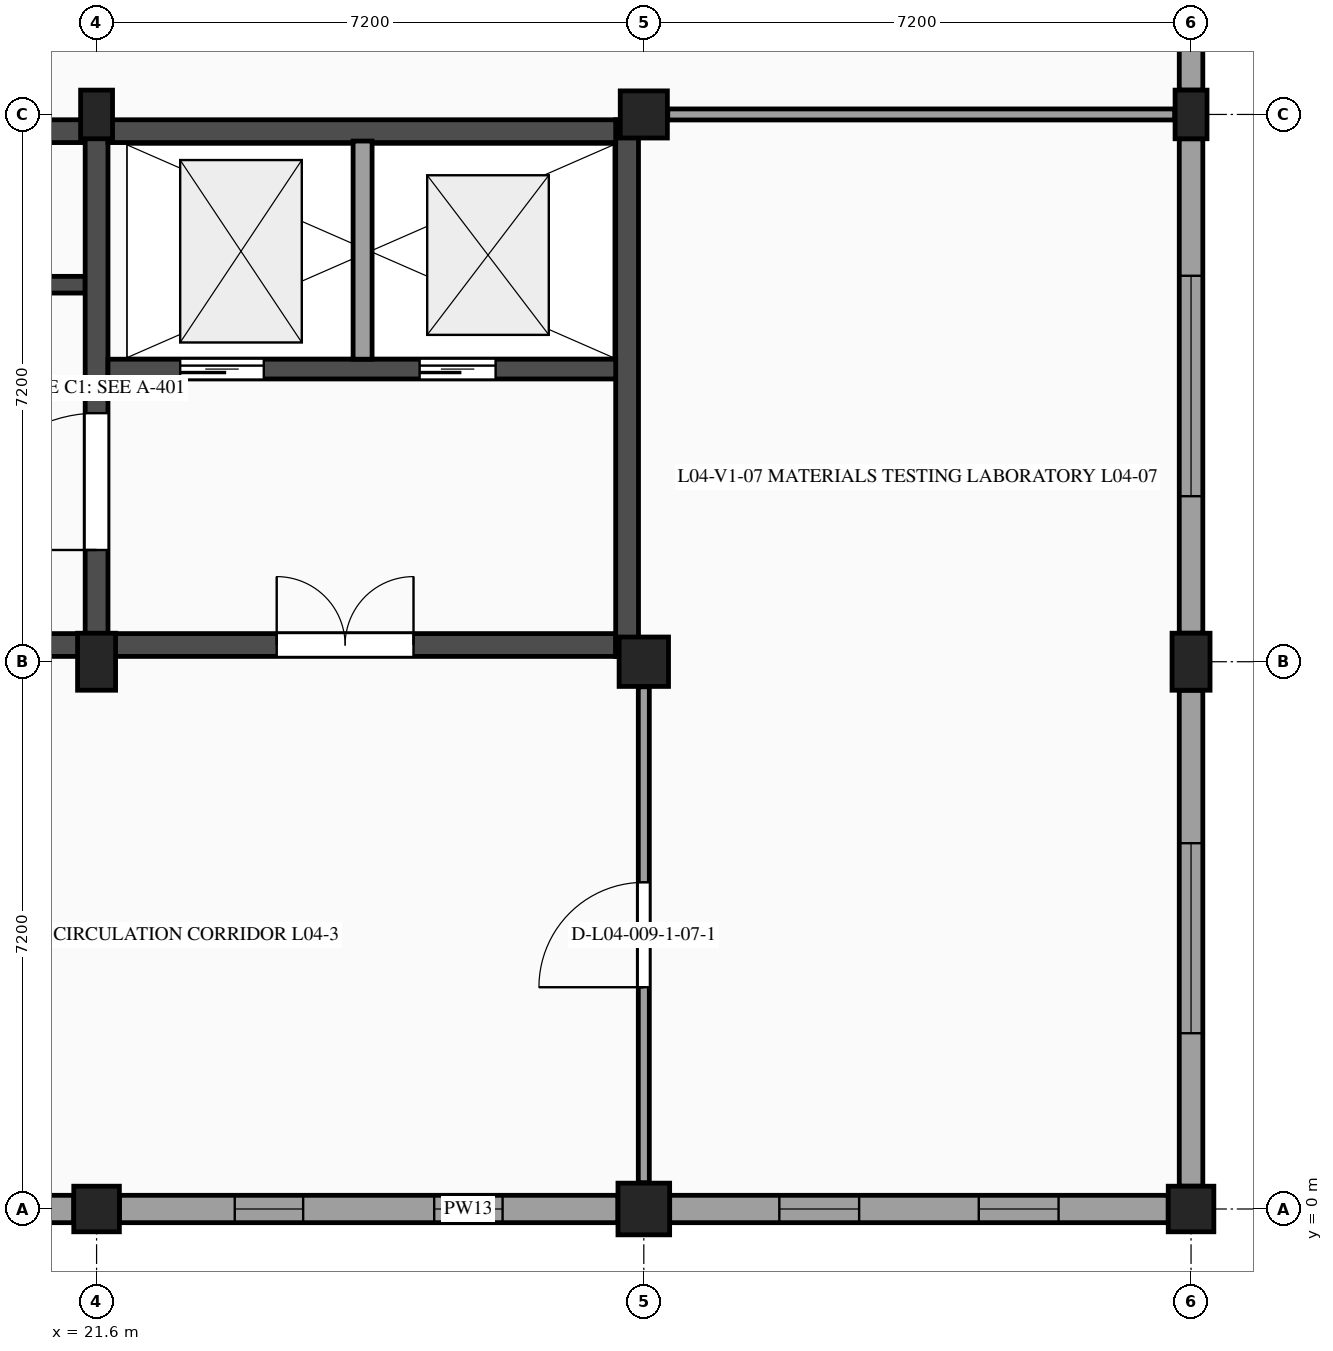
"""IFC4 building model, lengths in metres.
Left out: names, types, materials, properties, quantities, classifications, styles, units other than length and angle.
Written with IfcOpenShell. Run it as: python <this file> out.ifc"""

import sys

from ifc_helpers import new_model, si_unit, direction, frame, frame_2d, origin, origin_2d, place, context, subcontext, project, spatial, rectangle, extrude, element, fill, save


model = new_model("IFC4")
c1 = context("Model", 3, precision=1e-05, world=origin(), true_north=direction((0.0, 1.0)))
c2 = subcontext(c1, "Body", "Model", "MODEL_VIEW")
j1 = project(units=[si_unit("LENGTHUNIT", "METRE"), si_unit("PLANEANGLEUNIT", "RADIAN")], contexts=[c1])
p1 = place(None, origin())
s1 = spatial("IfcSite", under=j1, at=p1, CompositionType="ELEMENT")
p2 = place(p1, origin())
s2 = spatial("IfcBuilding", under=s1, at=p2, CompositionType="ELEMENT")
p3 = place(p2, frame((0.0, 0.0, 18.6)))
s3 = spatial("IfcBuildingStorey", under=s2, at=p3, CompositionType="ELEMENT", Elevation=18.6)
p4 = place(p3, frame((21.6, 0.0, 0.0), z_axis=(0.0, 0.0, 1.0), x_axis=(1.0, 0.0, 0.0)))
e1 = element("IfcColumn", 1, at=p4, inside=s3, PredefinedType="COLUMN", context=c2, shape_type="SweptSolid", body=[
    extrude(rectangle(XDim=0.6, YDim=0.6, at=origin_2d()), origin(), (0.0, 0.0, 1.0), 4.2),
])
p5 = place(p3, frame((21.6, 7.2, 0.0), z_axis=(0.0, 0.0, 1.0), x_axis=(1.0, 0.0, 0.0)))
e2 = element("IfcColumn", 2, at=p5, inside=s3, PredefinedType="COLUMN", context=c2, shape_type="SweptSolid", body=[
    extrude(rectangle(XDim=0.5, YDim=0.75, at=origin_2d()), origin(), (0.0, 0.0, 1.0), 4.2),
])
p6 = place(p3, frame((21.6, 14.4, 0.0), z_axis=(0.0, 0.0, 1.0), x_axis=(1.0, 0.0, 0.0)))
e3 = element("IfcColumn", 3, at=p6, inside=s3, PredefinedType="PILASTER", context=c2, shape_type="SweptSolid", body=[
    extrude(rectangle(XDim=0.42, YDim=0.64, at=origin_2d()), origin(), (0.0, 0.0, 1.0), 4.2),
])
p7 = place(p3, frame((28.8, 0.0, 0.0), z_axis=(0.0, 0.0, 1.0), x_axis=(1.0, 0.0, 0.0)))
e4 = element("IfcColumn", 4, at=p7, inside=s3, PredefinedType="COLUMN", context=c2, shape_type="SweptSolid", body=[
    extrude(rectangle(XDim=0.68, YDim=0.68, at=origin_2d()), origin(), (0.0, 0.0, 1.0), 4.2),
])
p8 = place(p3, frame((28.8, 7.2, 0.0), z_axis=(0.0, 0.0, 1.0), x_axis=(1.0, 0.0, 0.0)))
e5 = element("IfcColumn", 5, at=p8, inside=s3, PredefinedType="COLUMN", context=c2, shape_type="SweptSolid", body=[
    extrude(rectangle(XDim=0.65, YDim=0.65, at=origin_2d()), origin(), (0.0, 0.0, 1.0), 4.2),
])
p9 = place(p3, frame((28.8, 14.4, 0.0), z_axis=(0.0, 0.0, 1.0), x_axis=(1.0, 0.0, 0.0)))
e6 = element("IfcColumn", 6, at=p9, inside=s3, PredefinedType="COLUMN", context=c2, shape_type="SweptSolid", body=[
    extrude(rectangle(XDim=0.62, YDim=0.62, at=origin_2d()), origin(), (0.0, 0.0, 1.0), 4.2),
])
p10 = place(p3, frame((36.0, 0.0, 0.0), z_axis=(0.0, 0.0, 1.0), x_axis=(1.0, 0.0, 0.0)))
e7 = element("IfcColumn", 7, at=p10, inside=s3, PredefinedType="COLUMN", context=c2, shape_type="SweptSolid", body=[
    extrude(rectangle(XDim=0.6, YDim=0.6, at=origin_2d()), origin(), (0.0, 0.0, 1.0), 4.2),
])
p11 = place(p3, frame((36.0, 7.2, 0.0), z_axis=(0.0, 0.0, 1.0), x_axis=(1.0, 0.0, 0.0)))
e8 = element("IfcColumn", 8, at=p11, inside=s3, PredefinedType="COLUMN", context=c2, shape_type="SweptSolid", body=[
    extrude(rectangle(XDim=0.5, YDim=0.75, at=origin_2d()), origin(), (0.0, 0.0, 1.0), 4.2),
])
p12 = place(p3, frame((36.0, 14.4, 0.0), z_axis=(0.0, 0.0, 1.0), x_axis=(1.0, 0.0, 0.0)))
e9 = element("IfcColumn", 9, at=p12, inside=s3, PredefinedType="PILASTER", context=c2, shape_type="SweptSolid", body=[
    extrude(rectangle(XDim=0.42, YDim=0.64, at=origin_2d()), origin(), (0.0, 0.0, 1.0), 4.2),
])
p13 = place(p3, frame((36.0, 21.26, 0.0), z_axis=(0.0, 0.0, 1.0), x_axis=(0.0, -1.0, 0.0)))
e10 = element("IfcWall", 10, at=p13, inside=s3, PredefinedType="STANDARD", context=c2, shape_type="SweptSolid", body=[
    extrude(rectangle(XDim=6.54, YDim=0.31, at=frame_2d((3.27, 0.0))), origin(), (0.0, 0.0, 1.0), 3.15),
])
p14 = place(p13, frame((1.37, 0.0, 0.98)))
e11 = element("IfcOpeningElement", 11, at=p14, cuts=e10, PredefinedType="OPENING", context=c2, shape_type="SweptSolid", body=[
    extrude(rectangle(XDim=3.8, YDim=1.6, at=frame_2d((1.9, 0.8))), frame((0.0, 0.165, 0.0), z_axis=(0.0, -1.0, 0.0), x_axis=(1.0, 0.0, 0.0)), (0.0, 0.0, 1.0), 0.33),
])
p15 = place(p3, frame((36.0, 14.08, 0.0), z_axis=(0.0, 0.0, 1.0), x_axis=(0.0, -1.0, 0.0)))
e12 = element("IfcWall", 12, at=p15, inside=s3, PredefinedType="STANDARD", context=c2, shape_type="SweptSolid", body=[
    extrude(rectangle(XDim=6.505, YDim=0.31, at=frame_2d((3.252, 0.0))), origin(), (0.0, 0.0, 1.0), 3.15),
])
p16 = place(p15, frame((1.802, 0.0, 0.98)))
e13 = element("IfcOpeningElement", 13, at=p16, cuts=e12, PredefinedType="OPENING", context=c2, shape_type="SweptSolid", body=[
    extrude(rectangle(XDim=2.9, YDim=1.6, at=frame_2d((1.45, 0.8))), frame((0.0, 0.165, 0.0), z_axis=(0.0, -1.0, 0.0), x_axis=(1.0, 0.0, 0.0)), (0.0, 0.0, 1.0), 0.33),
])
p17 = place(p3, frame((36.0, 6.825, 0.0), z_axis=(0.0, 0.0, 1.0), x_axis=(0.0, -1.0, 0.0)))
e14 = element("IfcWall", 14, at=p17, inside=s3, PredefinedType="STANDARD", context=c2, shape_type="SweptSolid", body=[
    extrude(rectangle(XDim=6.525, YDim=0.31, at=frame_2d((3.262, 0.0))), origin(), (0.0, 0.0, 1.0), 3.15),
])
p18 = place(p17, frame((2.012, 0.0, 0.98)))
e15 = element("IfcOpeningElement", 15, at=p18, cuts=e14, PredefinedType="OPENING", context=c2, shape_type="SweptSolid", body=[
    extrude(rectangle(XDim=2.5, YDim=1.35, at=frame_2d((1.25, 0.675))), frame((0.0, 0.165, 0.0), z_axis=(0.0, -1.0, 0.0), x_axis=(1.0, 0.0, 0.0)), (0.0, 0.0, 1.0), 0.33),
])
p19 = place(p3, frame((35.7, 0.0, 0.0), z_axis=(0.0, 0.0, 1.0), x_axis=(-1.0, 0.0, 0.0)))
e16 = element("IfcWall", 16, at=p19, inside=s3, PredefinedType="STANDARD", context=c2, shape_type="SweptSolid", body=[
    extrude(rectangle(XDim=6.56, YDim=0.36, at=frame_2d((3.28, 0.0))), origin(), (0.0, 0.0, 1.0), 3.2),
])
p20 = place(p19, frame((1.443, 0.0, 1.15)))
e17 = element("IfcOpeningElement", 17, at=p20, cuts=e16, PredefinedType="OPENING", context=c2, shape_type="SweptSolid", body=[
    extrude(rectangle(XDim=1.05, YDim=1.35, at=frame_2d((0.525, 0.675))), frame((0.0, 0.19, 0.0), z_axis=(0.0, -1.0, 0.0), x_axis=(1.0, 0.0, 0.0)), (0.0, 0.0, 1.0), 0.38),
])
p21 = place(p19, frame((4.067, 0.0, 1.15)))
e18 = element("IfcOpeningElement", 18, at=p21, cuts=e16, PredefinedType="OPENING", context=c2, shape_type="SweptSolid", body=[
    extrude(rectangle(XDim=1.05, YDim=1.35, at=frame_2d((0.525, 0.675))), frame((0.0, 0.19, 0.0), z_axis=(0.0, -1.0, 0.0), x_axis=(1.0, 0.0, 0.0)), (0.0, 0.0, 1.0), 0.38),
])
p22 = place(p3, frame((28.46, 0.0, 0.0), z_axis=(0.0, 0.0, 1.0), x_axis=(-1.0, 0.0, 0.0)))
e19 = element("IfcWall", 19, at=p22, inside=s3, PredefinedType="STANDARD", context=c2, shape_type="SweptSolid", body=[
    extrude(rectangle(XDim=6.56, YDim=0.36, at=frame_2d((3.28, 0.0))), origin(), (0.0, 0.0, 1.0), 3.2),
])
p23 = place(p22, frame((1.518, 0.0, 1.15)))
e20 = element("IfcOpeningElement", 20, at=p23, cuts=e19, PredefinedType="OPENING", context=c2, shape_type="SweptSolid", body=[
    extrude(rectangle(XDim=0.9, YDim=1.3, at=frame_2d((0.45, 0.65))), frame((0.0, 0.19, 0.0), z_axis=(0.0, -1.0, 0.0), x_axis=(1.0, 0.0, 0.0)), (0.0, 0.0, 1.0), 0.38),
])
p24 = place(p22, frame((4.142, 0.0, 1.15)))
e21 = element("IfcOpeningElement", 21, at=p24, cuts=e19, PredefinedType="OPENING", context=c2, shape_type="SweptSolid", body=[
    extrude(rectangle(XDim=0.9, YDim=1.3, at=frame_2d((0.45, 0.65))), frame((0.0, 0.19, 0.0), z_axis=(0.0, -1.0, 0.0), x_axis=(1.0, 0.0, 0.0)), (0.0, 0.0, 1.0), 0.38),
])
p25 = place(p3, frame((21.3, 0.0, 0.0), z_axis=(0.0, 0.0, 1.0), x_axis=(-1.0, 0.0, 0.0)))
e22 = element("IfcWall", 22, at=p25, inside=s3, PredefinedType="STANDARD", context=c2, shape_type="SweptSolid", body=[
    extrude(rectangle(XDim=6.56, YDim=0.36, at=frame_2d((3.28, 0.0))), origin(), (0.0, 0.0, 1.0), 3.2),
])
p26 = place(p25, frame((1.218, 0.0, 1.15)))
e23 = element("IfcOpeningElement", 23, at=p26, cuts=e22, PredefinedType="OPENING", context=c2, shape_type="SweptSolid", body=[
    extrude(rectangle(XDim=1.5, YDim=1.2, at=frame_2d((0.75, 0.6))), frame((0.0, 0.19, 0.0), z_axis=(0.0, -1.0, 0.0), x_axis=(1.0, 0.0, 0.0)), (0.0, 0.0, 1.0), 0.38),
])
p27 = place(p25, frame((3.842, 0.0, 1.15)))
e24 = element("IfcOpeningElement", 24, at=p27, cuts=e22, PredefinedType="OPENING", context=c2, shape_type="SweptSolid", body=[
    extrude(rectangle(XDim=1.5, YDim=1.2, at=frame_2d((0.75, 0.6))), frame((0.0, 0.19, 0.0), z_axis=(0.0, -1.0, 0.0), x_axis=(1.0, 0.0, 0.0)), (0.0, 0.0, 1.0), 0.38),
])
p28 = place(p3, frame((14.77, 7.42, 0.0), z_axis=(0.0, 0.0, 1.0), x_axis=(1.0, 0.0, 0.0)))
e25 = element("IfcWall", 25, at=p28, inside=s3, PredefinedType="SHEAR", context=c2, shape_type="SweptSolid", body=[
    extrude(rectangle(XDim=6.68, YDim=0.3, at=frame_2d((3.34, 0.0))), origin(), (0.0, 0.0, 1.0), 3.955),
])
p29 = place(p3, frame((14.77, 14.18, 0.0), z_axis=(0.0, 0.0, 1.0), x_axis=(1.0, 0.0, 0.0)))
e26 = element("IfcWall", 26, at=p29, inside=s3, PredefinedType="SHEAR", context=c2, shape_type="SweptSolid", body=[
    extrude(rectangle(XDim=6.68, YDim=0.3, at=frame_2d((3.34, 0.0))), origin(), (0.0, 0.0, 1.0), 3.955),
])
p30 = place(p29, frame((1.42, 0.0, 0.0)))
e27 = element("IfcOpeningElement", 27, at=p30, cuts=e26, PredefinedType="OPENING", context=c2, shape_type="SweptSolid", body=[
    extrude(rectangle(XDim=0.85, YDim=2.1, at=frame_2d((0.425, 1.05))), frame((0.0, 0.16, 0.0), z_axis=(0.0, -1.0, 0.0), x_axis=(1.0, 0.0, 0.0)), (0.0, 0.0, 1.0), 0.32),
])
p31 = place(p29, frame((3.4, 0.0, 0.0)))
e28 = element("IfcOpeningElement", 28, at=p31, cuts=e26, PredefinedType="OPENING", context=c2, shape_type="SweptSolid", body=[
    extrude(rectangle(XDim=0.95, YDim=2.15, at=frame_2d((0.475, 1.075))), frame((0.0, 0.16, 0.0), z_axis=(0.0, -1.0, 0.0), x_axis=(1.0, 0.0, 0.0)), (0.0, 0.0, 1.0), 0.32),
])
p32 = place(p3, frame((14.77, 12.16, 0.0), z_axis=(0.0, 0.0, 1.0), x_axis=(1.0, 0.0, 0.0)))
e29 = element("IfcWall", 29, at=p32, inside=s3, PredefinedType="SHEAR", context=c2, shape_type="SweptSolid", body=[
    extrude(rectangle(XDim=6.68, YDim=0.22, at=frame_2d((3.34, 0.0))), origin(), (0.0, 0.0, 1.0), 3.955),
])
p33 = place(p3, frame((21.6, 7.27, 0.0), z_axis=(0.0, 0.0, 1.0), x_axis=(0.0, 1.0, 0.0)))
e30 = element("IfcWall", 30, at=p33, inside=s3, PredefinedType="SHEAR", context=c2, shape_type="SweptSolid", body=[
    extrude(rectangle(XDim=7.06, YDim=0.3, at=frame_2d((3.53, 0.0))), origin(), (0.0, 0.0, 1.0), 3.955),
])
p34 = place(p33, frame((1.4, 0.0, 0.0)))
e31 = element("IfcOpeningElement", 31, at=p34, cuts=e30, PredefinedType="OPENING", context=c2, shape_type="SweptSolid", body=[
    extrude(rectangle(XDim=1.8, YDim=2.2, at=frame_2d((0.9, 1.1))), frame((0.0, 0.16, 0.0), z_axis=(0.0, -1.0, 0.0), x_axis=(1.0, 0.0, 0.0)), (0.0, 0.0, 1.0), 0.32),
])
p35 = place(p3, frame((21.75, 7.42, 0.0), z_axis=(0.0, 0.0, 1.0), x_axis=(1.0, 0.0, 0.0)))
e32 = element("IfcWall", 32, at=p35, inside=s3, PredefinedType="SHEAR", context=c2, shape_type="SweptSolid", body=[
    extrude(rectangle(XDim=6.68, YDim=0.3, at=frame_2d((3.34, 0.0))), origin(), (0.0, 0.0, 1.0), 3.955),
])
p36 = place(p35, frame((2.22, 0.0, 0.0)))
e33 = element("IfcOpeningElement", 33, at=p36, cuts=e32, PredefinedType="OPENING", context=c2, shape_type="SweptSolid", body=[
    extrude(rectangle(XDim=1.8, YDim=2.2, at=frame_2d((0.9, 1.1))), frame((0.0, 0.16, 0.0), z_axis=(0.0, -1.0, 0.0), x_axis=(1.0, 0.0, 0.0)), (0.0, 0.0, 1.0), 0.32),
])
p37 = place(p3, frame((28.58, 7.27, 0.0), z_axis=(0.0, 0.0, 1.0), x_axis=(0.0, 1.0, 0.0)))
e34 = element("IfcWall", 34, at=p37, inside=s3, PredefinedType="SHEAR", context=c2, shape_type="SweptSolid", body=[
    extrude(rectangle(XDim=7.06, YDim=0.3, at=frame_2d((3.53, 0.0))), origin(), (0.0, 0.0, 1.0), 3.955),
])
p38 = place(p3, frame((21.75, 14.18, 0.0), z_axis=(0.0, 0.0, 1.0), x_axis=(1.0, 0.0, 0.0)))
e35 = element("IfcWall", 35, at=p38, inside=s3, PredefinedType="SHEAR", context=c2, shape_type="SweptSolid", body=[
    extrude(rectangle(XDim=6.68, YDim=0.3, at=frame_2d((3.34, 0.0))), origin(), (0.0, 0.0, 1.0), 3.955),
])
p39 = place(p3, frame((21.75, 11.05, 0.0), z_axis=(0.0, 0.0, 1.0), x_axis=(1.0, 0.0, 0.0)))
e36 = element("IfcWall", 36, at=p39, inside=s3, PredefinedType="SHEAR", context=c2, shape_type="SweptSolid", body=[
    extrude(rectangle(XDim=6.68, YDim=0.26, at=frame_2d((3.34, 0.0))), origin(), (0.0, 0.0, 1.0), 3.955),
])
p40 = place(p39, frame((0.95, 0.0, 0.0)))
e37 = element("IfcOpeningElement", 37, at=p40, cuts=e36, PredefinedType="OPENING", context=c2, shape_type="SweptSolid", body=[
    extrude(rectangle(XDim=1.1, YDim=2.2, at=frame_2d((0.55, 1.1))), frame((0.0, 0.14, 0.0), z_axis=(0.0, -1.0, 0.0), x_axis=(1.0, 0.0, 0.0)), (0.0, 0.0, 1.0), 0.28),
])
p41 = place(p39, frame((4.1, 0.0, 0.0)))
e38 = element("IfcOpeningElement", 38, at=p41, cuts=e36, PredefinedType="OPENING", context=c2, shape_type="SweptSolid", body=[
    extrude(rectangle(XDim=1.0, YDim=2.15, at=frame_2d((0.5, 1.075))), frame((0.0, 0.14, 0.0), z_axis=(0.0, -1.0, 0.0), x_axis=(1.0, 0.0, 0.0)), (0.0, 0.0, 1.0), 0.28),
])
p42 = place(p3, frame((25.1, 11.18, 0.0), z_axis=(0.0, 0.0, 1.0), x_axis=(0.0, 1.0, 0.0)))
e39 = element("IfcWall", 39, at=p42, inside=s3, PredefinedType="PARTITIONING", context=c2, shape_type="SweptSolid", body=[
    extrude(rectangle(XDim=2.87, YDim=0.25, at=frame_2d((1.435, 0.0))), origin(), (0.0, 0.0, 1.0), 3.955),
])
p43 = place(p3, frame((28.8, 0.345, 0.0), z_axis=(0.0, 0.0, 1.0), x_axis=(0.0, 1.0, 0.0)))
e40 = element("IfcWall", 40, at=p43, inside=s3, PredefinedType="PARTITIONING", context=c2, shape_type="SweptSolid", body=[
    extrude(rectangle(XDim=6.525, YDim=0.145, at=frame_2d((3.263, 0.0))), origin(), (0.0, 0.0, 1.0), 3.26),
])
p44 = place(p43, frame((2.573, 0.0, 0.0)))
e41 = element("IfcOpeningElement", 41, at=p44, cuts=e40, PredefinedType="OPENING", context=c2, shape_type="SweptSolid", body=[
    extrude(rectangle(XDim=1.38, YDim=2.22, at=frame_2d((0.69, 1.11))), frame((0.0, 0.083, 0.0), z_axis=(0.0, -1.0, 0.0), x_axis=(1.0, 0.0, 0.0)), (0.0, 0.0, 1.0), 0.165),
])
p45 = place(p3, frame((29.115, 14.4, 0.0), z_axis=(0.0, 0.0, 1.0), x_axis=(1.0, 0.0, 0.0)))
e42 = element("IfcWall", 42, at=p45, inside=s3, PredefinedType="PARTITIONING", context=c2, shape_type="SweptSolid", body=[
    extrude(rectangle(XDim=6.67, YDim=0.145, at=frame_2d((3.335, 0.0))), origin(), (0.0, 0.0, 1.0), 3.315),
])
p46 = place(p16, origin())
e43 = element("IfcWindow", 43, at=p46, inside=s3, PartitioningType="SINGLE_PANEL", PredefinedType="WINDOW", context=c2, shape_type="SweptSolid", body=[
    extrude(rectangle(XDim=2.9, YDim=1.6, at=frame_2d((1.45, 0.8))), frame((0.0, -0.03, 0.0), z_axis=(0.0, -1.0, 0.0), x_axis=(1.0, 0.0, 0.0)), (0.0, 0.0, 1.0), 0.06),
])
fill(e13, e43)
p47 = place(p18, origin())
e44 = element("IfcWindow", 44, at=p47, inside=s3, PartitioningType="SINGLE_PANEL", PredefinedType="WINDOW", context=c2, shape_type="SweptSolid", body=[
    extrude(rectangle(XDim=2.5, YDim=1.35, at=frame_2d((1.25, 0.675))), frame((0.0, -0.03, 0.0), z_axis=(0.0, -1.0, 0.0), x_axis=(1.0, 0.0, 0.0)), (0.0, 0.0, 1.0), 0.06),
])
fill(e15, e44)
p48 = place(p20, origin())
e45 = element("IfcWindow", 45, at=p48, inside=s3, PartitioningType="SINGLE_PANEL", PredefinedType="WINDOW", context=c2, shape_type="SweptSolid", body=[
    extrude(rectangle(XDim=1.05, YDim=1.35, at=frame_2d((0.525, 0.675))), frame((0.0, -0.08, 0.0), z_axis=(0.0, -1.0, 0.0), x_axis=(1.0, 0.0, 0.0)), (0.0, 0.0, 1.0), 0.06),
])
fill(e17, e45)
p49 = place(p21, origin())
e46 = element("IfcWindow", 46, at=p49, inside=s3, PartitioningType="SINGLE_PANEL", PredefinedType="WINDOW", context=c2, shape_type="SweptSolid", body=[
    extrude(rectangle(XDim=1.05, YDim=1.35, at=frame_2d((0.525, 0.675))), frame((0.0, -0.08, 0.0), z_axis=(0.0, -1.0, 0.0), x_axis=(1.0, 0.0, 0.0)), (0.0, 0.0, 1.0), 0.06),
])
fill(e18, e46)
p50 = place(p23, origin())
e47 = element("IfcWindow", 47, at=p50, inside=s3, PartitioningType="SINGLE_PANEL", PredefinedType="WINDOW", context=c2, shape_type="SweptSolid", body=[
    extrude(rectangle(XDim=0.9, YDim=1.3, at=frame_2d((0.45, 0.65))), frame((0.0, -0.08, 0.0), z_axis=(0.0, -1.0, 0.0), x_axis=(1.0, 0.0, 0.0)), (0.0, 0.0, 1.0), 0.06),
])
fill(e20, e47)
p51 = place(p24, origin())
e48 = element("IfcWindow", 48, at=p51, inside=s3, PartitioningType="SINGLE_PANEL", PredefinedType="WINDOW", context=c2, shape_type="SweptSolid", body=[
    extrude(rectangle(XDim=0.9, YDim=1.3, at=frame_2d((0.45, 0.65))), frame((0.0, -0.08, 0.0), z_axis=(0.0, -1.0, 0.0), x_axis=(1.0, 0.0, 0.0)), (0.0, 0.0, 1.0), 0.06),
])
fill(e21, e48)
p52 = place(p34, origin())
e49 = element("IfcDoor", 49, at=p52, inside=s3, OperationType="SINGLE_SWING_LEFT", PredefinedType="DOOR", context=c2, shape_type="SweptSolid", body=[
    extrude(rectangle(XDim=1.8, YDim=2.2, at=frame_2d((0.9, 1.1))), frame((0.0, 0.025, 0.0), z_axis=(0.0, -1.0, 0.0), x_axis=(1.0, 0.0, 0.0)), (0.0, 0.0, 1.0), 0.05),
])
fill(e31, e49)
p53 = place(p40, origin())
e50 = element("IfcDoor", 50, at=p53, inside=s3, OperationType="SLIDING_TO_LEFT", PredefinedType="DOOR", context=c2, shape_type="SweptSolid", body=[
    extrude(rectangle(XDim=1.1, YDim=2.2, at=frame_2d((0.55, 1.1))), frame((0.0, 0.025, 0.0), z_axis=(0.0, -1.0, 0.0), x_axis=(1.0, 0.0, 0.0)), (0.0, 0.0, 1.0), 0.05),
])
fill(e37, e50)
p54 = place(p41, origin())
e51 = element("IfcDoor", 51, at=p54, inside=s3, OperationType="SLIDING_TO_RIGHT", PredefinedType="DOOR", context=c2, shape_type="SweptSolid", body=[
    extrude(rectangle(XDim=1.0, YDim=2.15, at=frame_2d((0.5, 1.075))), frame((0.0, 0.025, 0.0), z_axis=(0.0, -1.0, 0.0), x_axis=(1.0, 0.0, 0.0)), (0.0, 0.0, 1.0), 0.05),
])
fill(e38, e51)
p55 = place(p36, origin())
e52 = element("IfcDoor", 52, at=p55, inside=s3, OperationType="DOUBLE_DOOR_SINGLE_SWING", PredefinedType="DOOR", context=c2, shape_type="SweptSolid", body=[
    extrude(rectangle(XDim=1.8, YDim=2.2, at=frame_2d((0.9, 1.1))), frame((0.0, 0.025, 0.0), z_axis=(0.0, -1.0, 0.0), x_axis=(1.0, 0.0, 0.0)), (0.0, 0.0, 1.0), 0.05),
])
fill(e33, e52)
p56 = place(p44, origin())
e53 = element("IfcDoor", 53, at=p56, inside=s3, OperationType="SINGLE_SWING_LEFT", PredefinedType="DOOR", context=c2, shape_type="SweptSolid", body=[
    extrude(rectangle(XDim=1.38, YDim=2.22, at=frame_2d((0.69, 1.11))), frame((0.0, 0.025, 0.0), z_axis=(0.0, -1.0, 0.0), x_axis=(1.0, 0.0, 0.0)), (0.0, 0.0, 1.0), 0.05),
])
fill(e41, e53)
save(model, sys.argv[1])
